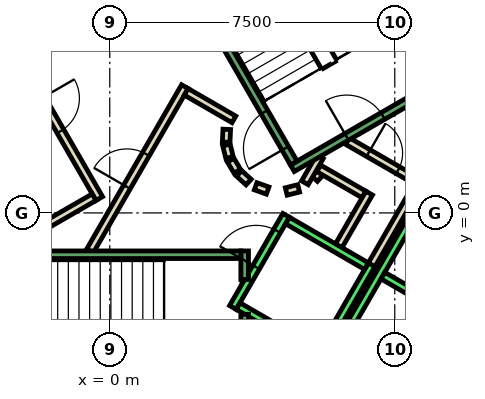
"""IFC4 building model, lengths in metres.
Left out: names, types, materials, properties, quantities, classifications, styles, units other than length and angle.
Written with IfcOpenShell. Run it as: python <this file> out.ifc"""

import sys

from ifc_helpers import new_model, si_unit, direction, frame, frame_2d, origin, place, context, subcontext, project, spatial, polyline, rectangle, outline, extrude, element, fill, save


model = new_model("IFC4")
c1 = context("Model", 3, precision=1e-05, world=origin(), true_north=direction((0.0, 1.0)))
c2 = subcontext(c1, "Body", "Model", "MODEL_VIEW")
j1 = project(units=[si_unit("LENGTHUNIT", "METRE"), si_unit("PLANEANGLEUNIT", "RADIAN")], contexts=[c1])
p1 = place(None, origin())
s1 = spatial("IfcSite", under=j1, at=p1, CompositionType="ELEMENT")
p2 = place(p1, origin())
s2 = spatial("IfcBuilding", under=s1, at=p2, CompositionType="ELEMENT")
p3 = place(p2, frame((0.0, 0.0, 56.0)))
s3 = spatial("IfcBuildingStorey", under=s2, at=p3, CompositionType="ELEMENT", Elevation=56.0)
p4 = place(p3, frame((0.0, 0.0, -0.4)))
e1 = element("IfcWall", 1, at=p4, inside=s3, PredefinedType="SHEAR", context=c2, shape_type="SweptSolid", body=[
    extrude(outline(polyline([(8.517, 11.748), (7.651, 11.248), (12.702, 2.5), (13.856, 2.5), (8.517, 11.748)])), origin(), (0.0, 0.0, 1.0), 4.2),
])
p5 = place(p3, frame((5.39, 0.898, 0.0), z_axis=(0.0, 0.0, 1.0), x_axis=(0.673828488714, 0.738887791073, 0.0)))
e2 = element("IfcWall", 2, at=p5, inside=s3, PredefinedType="PARTITIONING", context=c2, shape_type="SweptSolid", body=[
    extrude(rectangle(XDim=0.263, YDim=0.2, at=frame_2d((0.131, 0.0))), origin(), (0.0, 0.0, 1.0), 3.8),
])
p6 = place(p3, frame((5.499, 1.172, 0.0), z_axis=(0.0, 0.0, 1.0), x_axis=(0.866333505267, -0.499465972466, 0.0)))
e3 = element("IfcWall", 3, at=p6, inside=s3, PredefinedType="PARTITIONING", context=c2, shape_type="SweptSolid", body=[
    extrude(rectangle(XDim=1.374, YDim=0.2, at=frame_2d((0.687, 0.0))), origin(), (0.0, 0.0, 1.0), 3.8),
])
p7 = place(p3, frame((6.826, 0.522, 0.0), z_axis=(0.0, 0.0, 1.0), x_axis=(-0.500016722714, -0.866015748706, 0.0)))
e4 = element("IfcWall", 4, at=p7, inside=s3, PredefinedType="PARTITIONING", context=c2, shape_type="SweptSolid", body=[
    extrude(rectangle(XDim=1.7, YDim=0.2, at=frame_2d((0.85, 0.0))), origin(), (0.0, 0.0, 1.0), 3.8),
])
p8 = place(p3, frame((6.25, 1.894, 0.0), z_axis=(0.0, 0.0, 1.0), x_axis=(0.866043184279, -0.499969202016, 0.0)))
e5 = element("IfcWall", 5, at=p8, inside=s3, PredefinedType="PARTITIONING", context=c2, shape_type="SweptSolid", body=[
    extrude(rectangle(XDim=2.084, YDim=0.2, at=frame_2d((1.042, 0.0))), origin(), (0.0, 0.0, 1.0), 3.8),
])
p9 = place(p8, frame((0.642, 0.0, 0.0)))
e6 = element("IfcOpeningElement", 6, at=p9, cuts=e5, PredefinedType="OPENING", context=c2, shape_type="SweptSolid", body=[
    extrude(rectangle(XDim=0.9, YDim=2.1, at=frame_2d((0.45, 1.05))), frame((0.0, 0.11, 0.0), z_axis=(0.0, -1.0, 0.0), x_axis=(1.0, 0.0, 0.0)), (0.0, 0.0, 1.0), 0.22),
])
p10 = place(p3, frame((8.192, 0.888, 0.0), z_axis=(0.0, 0.0, 1.0), x_axis=(-0.499940625693, -0.866059680843, 0.0)))
e7 = element("IfcWall", 7, at=p10, inside=s3, PredefinedType="PARTITIONING", context=c2, shape_type="SweptSolid", body=[
    extrude(rectangle(XDim=2.68, YDim=0.2, at=frame_2d((1.34, 0.0))), origin(), (0.0, 0.0, 1.0), 3.8),
])
p11 = place(p3, frame((5.135, 0.793, 0.0), z_axis=(0.0, 0.0, 1.0), x_axis=(0.499526442893, 0.866298639529, 0.0)))
e8 = element("IfcWall", 8, at=p11, inside=s3, PredefinedType="PARTITIONING", context=c2, shape_type="SweptSolid", body=[
    extrude(rectangle(XDim=0.791, YDim=0.2, at=frame_2d((0.396, 0.0))), origin(), (0.0, 0.0, 1.0), 3.8),
])
p12 = place(p3, frame((-0.52, -1.0, 0.0), z_axis=(0.0, 0.0, 1.0), x_axis=(0.50011622646, 0.865958290007, 0.0)))
e9 = element("IfcWall", 9, at=p12, inside=s3, PredefinedType="PARTITIONING", context=c2, shape_type="SweptSolid", body=[
    extrude(rectangle(XDim=4.991, YDim=0.2, at=frame_2d((2.496, 0.0))), origin(), (0.0, 0.0, 1.0), 3.8),
])
p13 = place(p12, frame((1.945, 0.0, 0.0)))
e10 = element("IfcOpeningElement", 10, at=p13, cuts=e9, PredefinedType="OPENING", context=c2, shape_type="SweptSolid", body=[
    extrude(rectangle(XDim=1.0, YDim=2.1, at=frame_2d((0.5, 1.05))), frame((0.0, 0.11, 0.0), z_axis=(0.0, -1.0, 0.0), x_axis=(1.0, 0.0, 0.0)), (0.0, 0.0, 1.0), 0.22),
])
p14 = place(p3, frame((2.012, 3.186, 0.0), z_axis=(0.0, 0.0, 1.0), x_axis=(0.865891012941, -0.500232699559, 0.0)))
e11 = element("IfcWall", 11, at=p14, inside=s3, PredefinedType="PARTITIONING", context=c2, shape_type="SweptSolid", body=[
    extrude(rectangle(XDim=1.449, YDim=0.2, at=frame_2d((0.725, 0.0))), origin(), (0.0, 0.0, 1.0), 3.8),
])
p15 = place(p3, frame((3.079, 2.199, 0.0), z_axis=(0.0, 0.0, 1.0), x_axis=(-0.047771483479, -0.998858290933, 0.0)))
e12 = element("IfcWall", 12, at=p15, inside=s3, PredefinedType="PARTITIONING", context=c2, shape_type="SweptSolid", body=[
    extrude(rectangle(XDim=0.337, YDim=0.2, at=frame_2d((0.169, 0.0))), origin(), (0.0, 0.0, 1.0), 3.8),
])
p16 = place(p3, frame((3.07, 1.786, 0.0), z_axis=(0.0, 0.0, 1.0), x_axis=(0.242705583207, -0.970099994784, 0.0)))
e13 = element("IfcWall", 13, at=p16, inside=s3, PredefinedType="PARTITIONING", context=c2, shape_type="SweptSolid", body=[
    extrude(rectangle(XDim=0.338, YDim=0.2, at=frame_2d((0.169, 0.0))), origin(), (0.0, 0.0, 1.0), 3.8),
])
for number, where, z_axis, x_axis in (
    (14, (3.182, 1.388, 0.0), (0.0, 0.0, 1.0), (0.512, -0.859, 0.0)),
    (15, (3.404, 1.039, 0.0), (0.0, 0.0, 1.0), (0.74, -0.672, 0.0)),
):
    element("IfcWall", number, at=place(p3, frame(where, z_axis=z_axis, x_axis=x_axis)), inside=s3, PredefinedType="PARTITIONING", context=c2, shape_type="SweptSolid", body=[
        extrude(rectangle(XDim=0.338, YDim=0.2, at=frame_2d((0.169, 0.0))), origin(), (0.0, 0.0, 1.0), 3.8),
    ])
p17 = place(p3, frame((3.838, 0.702, 0.0), z_axis=(0.0, 0.0, 1.0), x_axis=(0.941035081519, -0.338308993895, 0.0)))
e16 = element("IfcWall", 16, at=p17, inside=s3, PredefinedType="PARTITIONING", context=c2, shape_type="SweptSolid", body=[
    extrude(rectangle(XDim=0.337, YDim=0.2, at=frame_2d((0.168, 0.0))), origin(), (0.0, 0.0, 1.0), 3.8),
])
p18 = place(p3, frame((4.644, 0.564, 0.0), z_axis=(0.0, 0.0, 1.0), x_axis=(0.969929076366, 0.243387729394, 0.0)))
e17 = element("IfcWall", 17, at=p18, inside=s3, PredefinedType="PARTITIONING", context=c2, shape_type="SweptSolid", body=[
    extrude(rectangle(XDim=0.337, YDim=0.2, at=frame_2d((0.168, 0.0))), origin(), (0.0, 0.0, 1.0), 3.8),
])
p19 = place(p3, frame((-2.771, 4.7, 0.0), z_axis=(0.0, 0.0, 1.0), x_axis=(0.499969479948, -0.866043023828, 0.0)))
e18 = element("IfcWall", 18, at=p19, inside=s3, PredefinedType="PARTITIONING", context=c2, shape_type="SweptSolid", body=[
    extrude(rectangle(XDim=4.99, YDim=0.2, at=frame_2d((2.495, 0.0))), origin(), (0.0, 0.0, 1.0), 3.8),
])
p20 = place(p19, frame((1.945, 0.0, 0.0)))
e19 = element("IfcOpeningElement", 19, at=p20, cuts=e18, PredefinedType="OPENING", context=c2, shape_type="SweptSolid", body=[
    extrude(rectangle(XDim=1.0, YDim=2.1, at=frame_2d((0.5, 1.05))), frame((0.0, 0.11, 0.0), z_axis=(0.0, -1.0, 0.0), x_axis=(1.0, 0.0, 0.0)), (0.0, 0.0, 1.0), 0.22),
])
p21 = place(p3, frame((-0.412, 0.414, 0.0), z_axis=(0.0, 0.0, 1.0), x_axis=(-0.866017369001, -0.500013916395, 0.0)))
e20 = element("IfcWall", 20, at=p21, inside=s3, PredefinedType="PARTITIONING", context=c2, shape_type="SweptSolid", body=[
    extrude(rectangle(XDim=1.45, YDim=0.2, at=frame_2d((0.725, 0.0))), origin(), (0.0, 0.0, 1.0), 3.8),
])
p22 = place(p3, frame((3.24, -2.488, 0.0), z_axis=(0.0, 0.0, 1.0), x_axis=(0.49994636267, 0.866056369097, 0.0)))
e21 = element("IfcWall", 21, at=p22, inside=s3, PredefinedType="STANDARD", context=c2, shape_type="SweptSolid", body=[
    extrude(rectangle(XDim=2.8, YDim=0.2, at=frame_2d((1.4, 0.0))), origin(), (0.0, 0.0, 1.0), 3.8),
])
p23 = place(p22, frame((1.225, 0.0, 0.0)))
e22 = element("IfcOpeningElement", 22, at=p23, cuts=e21, PredefinedType="OPENING", context=c2, shape_type="SweptSolid", body=[
    extrude(rectangle(XDim=1.1, YDim=2.1, at=frame_2d((0.55, 1.05))), frame((0.0, 0.11, 0.0), z_axis=(0.0, -1.0, 0.0), x_axis=(1.0, 0.0, 0.0)), (0.0, 0.0, 1.0), 0.22),
])
p24 = place(p3, frame((5.492, -3.788, 0.0), z_axis=(0.0, 0.0, 1.0), x_axis=(0.500011755427, 0.866018616679, 0.0)))
e23 = element("IfcWall", 23, at=p24, inside=s3, PredefinedType="STANDARD", context=c2, shape_type="SweptSolid", body=[
    extrude(rectangle(XDim=2.8, YDim=0.2, at=frame_2d((1.4, 0.0))), origin(), (0.0, 0.0, 1.0), 3.8),
])
p25 = place(p3, frame((3.377, -2.452, 0.0), z_axis=(0.0, 0.0, 1.0), x_axis=(0.865955154139, -0.50012165622, 0.0)))
e24 = element("IfcWall", 24, at=p25, inside=s3, PredefinedType="STANDARD", context=c2, shape_type="SweptSolid", body=[
    extrude(rectangle(XDim=2.4, YDim=0.2, at=frame_2d((1.2, 0.0))), origin(), (0.0, 0.0, 1.0), 3.8),
])
p26 = place(p3, frame((4.677, -0.2, 0.0), z_axis=(0.0, 0.0, 1.0), x_axis=(0.865973769406, -0.500089422704, 0.0)))
e25 = element("IfcWall", 25, at=p26, inside=s3, PredefinedType="STANDARD", context=c2, shape_type="SweptSolid", body=[
    extrude(rectangle(XDim=2.399, YDim=0.2, at=frame_2d((1.2, 0.0))), origin(), (0.0, 0.0, 1.0), 3.8),
])
p27 = place(p3, frame((4.451, -6.19, 0.0), z_axis=(0.0, 0.0, 1.0), x_axis=(0.50000090737, 0.866024879913, 0.0)))
e26 = element("IfcWall", 26, at=p27, inside=s3, PredefinedType="STANDARD", context=c2, shape_type="SweptSolid", body=[
    extrude(rectangle(XDim=10.6, YDim=0.2, at=frame_2d((5.3, 0.0))), origin(), (0.0, 0.0, 1.0), 3.8),
])
p28 = place(p3, frame((7.188, -1.65, 0.0), z_axis=(0.0, 0.0, 1.0), x_axis=(0.866022959057, -0.500004234368, 0.0)))
e27 = element("IfcWall", 27, at=p28, inside=s3, PredefinedType="STANDARD", context=c2, shape_type="SweptSolid", body=[
    extrude(rectangle(XDim=2.5, YDim=0.2, at=frame_2d((1.25, 0.0))), origin(), (0.0, 0.0, 1.0), 3.8),
])
p29 = place(p3, frame((3.55, -2.667, 0.0), z_axis=(0.0, 0.0, 1.0), x_axis=(0.0, -1.0, 0.0)))
e28 = element("IfcWall", 28, at=p29, inside=s3, PredefinedType="STANDARD", context=c2, shape_type="SweptSolid", body=[
    extrude(rectangle(XDim=2.733, YDim=0.2, at=frame_2d((1.366, 0.0))), origin(), (0.0, 0.0, 1.0), 3.8),
])
p30 = place(p3, frame((3.55, -1.0, 0.0), z_axis=(0.0, 0.0, 1.0), x_axis=(0.0, -1.0, 0.0)))
e29 = element("IfcWall", 29, at=p30, inside=s3, PredefinedType="STANDARD", context=c2, shape_type="SweptSolid", body=[
    extrude(rectangle(XDim=0.751, YDim=0.2, at=frame_2d((0.375, 0.0))), origin(), (0.0, 0.0, 1.0), 3.8),
])
p31 = place(p3, frame((-3.45, -1.1, 0.0), z_axis=(0.0, 0.0, 1.0), x_axis=(1.0, 0.0, 0.0)))
e30 = element("IfcWall", 30, at=p31, inside=s3, PredefinedType="STANDARD", context=c2, shape_type="SweptSolid", body=[
    extrude(rectangle(XDim=6.9, YDim=0.2, at=frame_2d((3.45, 0.0))), origin(), (0.0, 0.0, 1.0), 3.8),
])
p32 = place(p31, frame((0.45, 0.0, 0.0)))
e31 = element("IfcOpeningElement", 31, at=p32, cuts=e30, PredefinedType="OPENING", context=c2, shape_type="SweptSolid", body=[
    extrude(rectangle(XDim=1.1, YDim=2.2, at=frame_2d((0.55, 1.1))), frame((0.0, 0.11, 0.0), z_axis=(0.0, -1.0, 0.0), x_axis=(1.0, 0.0, 0.0)), (0.0, 0.0, 1.0), 0.22),
])
p33 = place(p3, frame((4.806, 1.176, 0.0), z_axis=(0.0, 0.0, 1.0), x_axis=(0.866059941101, 0.499940174841, 0.0)))
e32 = element("IfcWall", 32, at=p33, inside=s3, PredefinedType="STANDARD", context=c2, shape_type="SweptSolid", body=[
    extrude(rectangle(XDim=4.4, YDim=0.2, at=frame_2d((2.2, 0.0))), origin(), (0.0, 0.0, 1.0), 3.8),
])
p34 = place(p33, frame((1.65, 0.0, 0.0)))
e33 = element("IfcOpeningElement", 33, at=p34, cuts=e32, PredefinedType="OPENING", context=c2, shape_type="SweptSolid", body=[
    extrude(rectangle(XDim=1.1, YDim=2.2, at=frame_2d((0.55, 1.1))), frame((0.0, 0.11, 0.0), z_axis=(0.0, -1.0, 0.0), x_axis=(1.0, 0.0, 0.0)), (0.0, 0.0, 1.0), 0.22),
])
p35 = place(p3, frame((4.843, 1.312, 0.0), z_axis=(0.0, 0.0, 1.0), x_axis=(-0.499963383562, 0.866046543262, 0.0)))
e34 = element("IfcWall", 34, at=p35, inside=s3, PredefinedType="STANDARD", context=c2, shape_type="SweptSolid", body=[
    extrude(rectangle(XDim=6.9, YDim=0.2, at=frame_2d((3.45, 0.0))), origin(), (0.0, 0.0, 1.0), 3.8),
])
p36 = place(p35, frame((0.45, 0.0, 0.0)))
e35 = element("IfcOpeningElement", 35, at=p36, cuts=e34, PredefinedType="OPENING", context=c2, shape_type="SweptSolid", body=[
    extrude(rectangle(XDim=1.1, YDim=2.2, at=frame_2d((0.55, 1.1))), frame((0.0, 0.11, 0.0), z_axis=(0.0, -1.0, 0.0), x_axis=(1.0, 0.0, 0.0)), (0.0, 0.0, 1.0), 0.22),
])
p37 = place(p3, frame((8.48, 3.412, 0.0), z_axis=(0.0, 0.0, 1.0), x_axis=(-0.499978703459, 0.866037698999, 0.0)))
e36 = element("IfcWall", 36, at=p37, inside=s3, PredefinedType="STANDARD", context=c2, shape_type="SweptSolid", body=[
    extrude(rectangle(XDim=6.9, YDim=0.2, at=frame_2d((3.45, 0.0))), origin(), (0.0, 0.0, 1.0), 3.8),
])
p38 = place(p3, frame((-1.393, 7.288, 0.0), z_axis=(0.0, 0.0, 1.0), x_axis=(-0.499963383562, -0.866046543262, 0.0)))
e37 = element("IfcWall", 37, at=p38, inside=s3, PredefinedType="STANDARD", context=c2, shape_type="SweptSolid", body=[
    extrude(rectangle(XDim=6.9, YDim=0.2, at=frame_2d((3.45, 0.0))), origin(), (0.0, 0.0, 1.0), 3.8),
])
p39 = place(p38, frame((0.45, 0.0, 0.0)))
e38 = element("IfcOpeningElement", 38, at=p39, cuts=e37, PredefinedType="OPENING", context=c2, shape_type="SweptSolid", body=[
    extrude(rectangle(XDim=1.1, YDim=2.2, at=frame_2d((0.55, 1.1))), frame((0.0, 0.11, 0.0), z_axis=(0.0, -1.0, 0.0), x_axis=(1.0, 0.0, 0.0)), (0.0, 0.0, 1.0), 0.22),
])
p40 = place(p13, origin())
e39 = element("IfcDoor", 39, at=p40, inside=s3, OperationType="SINGLE_SWING_LEFT", PredefinedType="DOOR", context=c2, shape_type="SweptSolid", body=[
    extrude(rectangle(XDim=1.0, YDim=2.1, at=frame_2d((0.5, 1.05))), frame((0.0, 0.025, 0.0), z_axis=(0.0, -1.0, 0.0), x_axis=(1.0, 0.0, 0.0)), (0.0, 0.0, 1.0), 0.05),
])
fill(e10, e39)
p41 = place(p20, origin())
e40 = element("IfcDoor", 40, at=p41, inside=s3, OperationType="SINGLE_SWING_RIGHT", PredefinedType="DOOR", context=c2, shape_type="SweptSolid", body=[
    extrude(rectangle(XDim=1.0, YDim=2.1, at=frame_2d((0.5, 1.05))), frame((0.0, 0.025, 0.0), z_axis=(0.0, -1.0, 0.0), x_axis=(1.0, 0.0, 0.0)), (0.0, 0.0, 1.0), 0.05),
])
fill(e19, e40)
p42 = place(p9, origin())
e41 = element("IfcDoor", 41, at=p42, inside=s3, OperationType="SINGLE_SWING_LEFT", PredefinedType="DOOR", context=c2, shape_type="SweptSolid", body=[
    extrude(rectangle(XDim=0.9, YDim=2.1, at=frame_2d((0.45, 1.05))), frame((0.0, 0.025, 0.0), z_axis=(0.0, -1.0, 0.0), x_axis=(1.0, 0.0, 0.0)), (0.0, 0.0, 1.0), 0.05),
])
fill(e6, e41)
p43 = place(p23, origin())
e42 = element("IfcDoor", 42, at=p43, inside=s3, OperationType="SLIDING_TO_LEFT", PredefinedType="DOOR", context=c2, shape_type="SweptSolid", body=[
    extrude(rectangle(XDim=1.1, YDim=2.1, at=frame_2d((0.55, 1.05))), frame((0.0, 0.025, 0.0), z_axis=(0.0, -1.0, 0.0), x_axis=(1.0, 0.0, 0.0)), (0.0, 0.0, 1.0), 0.05),
])
fill(e22, e42)
p44 = place(p36, origin())
e43 = element("IfcDoor", 43, at=p44, inside=s3, OperationType="SINGLE_SWING_LEFT", PredefinedType="DOOR", context=c2, shape_type="SweptSolid", body=[
    extrude(rectangle(XDim=1.1, YDim=2.2, at=frame_2d((0.55, 1.1))), frame((0.0, 0.025, 0.0), z_axis=(0.0, -1.0, 0.0), x_axis=(1.0, 0.0, 0.0)), (0.0, 0.0, 1.0), 0.05),
])
fill(e35, e43)
p45 = place(p34, origin())
e44 = element("IfcDoor", 44, at=p45, inside=s3, OperationType="SINGLE_SWING_LEFT", PredefinedType="DOOR", context=c2, shape_type="SweptSolid", body=[
    extrude(rectangle(XDim=1.1, YDim=2.2, at=frame_2d((0.55, 1.1))), frame((0.0, 0.025, 0.0), z_axis=(0.0, -1.0, 0.0), x_axis=(1.0, 0.0, 0.0)), (0.0, 0.0, 1.0), 0.05),
])
fill(e33, e44)
save(model, sys.argv[1])
